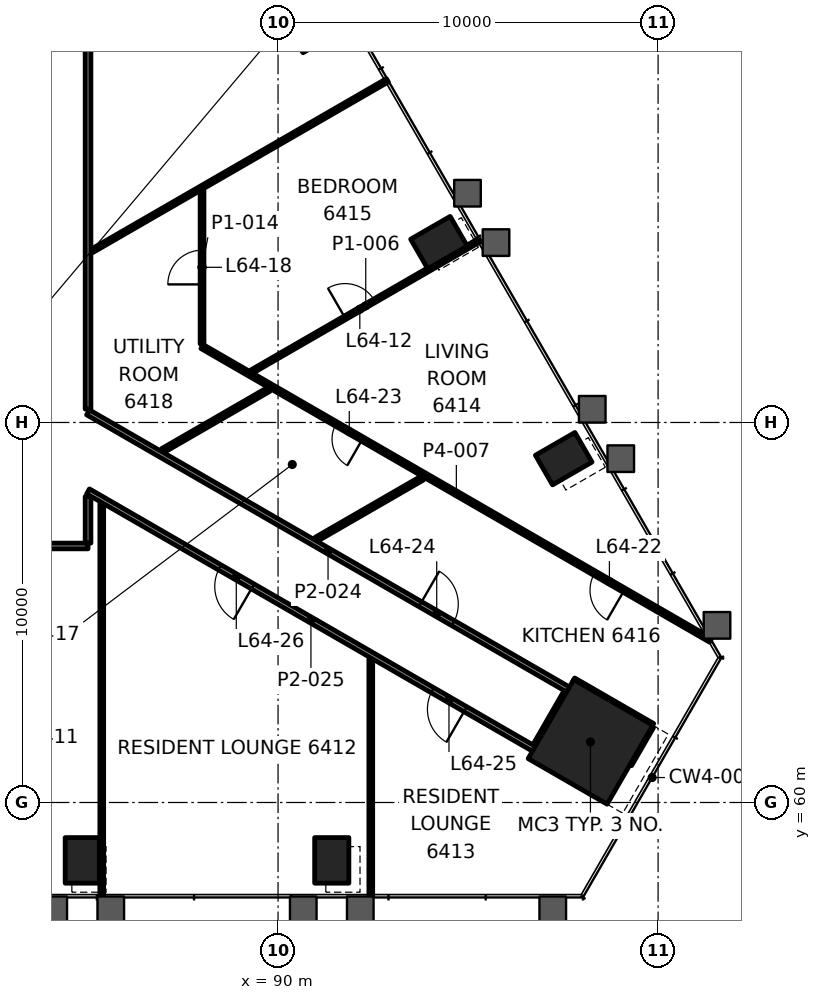
"""IFC4 building model, lengths in metres.
Left out: names, types, materials, properties, quantities, classifications, styles, units other than length and angle.
Written with IfcOpenShell. Run it as: python <this file> out.ifc"""

import sys

from ifc_helpers import new_model, si_unit, direction, frame, frame_2d, origin, origin_2d, place, context, subcontext, project, spatial, rectangle, hollow_rectangle, extrude, element, fill, save


model = new_model("IFC4")
c1 = context("Model", 3, precision=1e-05, world=origin(), true_north=direction((0.0, 1.0)))
c2 = subcontext(c1, "Body", "Model", "MODEL_VIEW")
j1 = project(units=[si_unit("LENGTHUNIT", "METRE"), si_unit("PLANEANGLEUNIT", "RADIAN")], contexts=[c1])
p1 = place(None, origin())
s1 = spatial("IfcSite", under=j1, at=p1, CompositionType="ELEMENT")
p2 = place(p1, origin())
s2 = spatial("IfcBuilding", under=s1, at=p2, CompositionType="ELEMENT")
p3 = place(p2, frame((0.0, 0.0, 270.6)))
s3 = spatial("IfcBuildingStorey", under=s2, at=p3, CompositionType="ELEMENT", Elevation=270.6)
p4 = place(p3, frame((98.22, 61.594, 0.0), z_axis=(0.0, 0.0, 1.0), x_axis=(0.5, 0.866025403784, 0.0)))
e1 = element("IfcColumn", 1, at=p4, inside=s3, PredefinedType="COLUMN", context=c2, shape_type="SweptSolid", body=[
    extrude(rectangle(XDim=2.4, YDim=2.4, at=origin_2d()), origin(), (0.0, 0.0, 1.0), 3.5),
])
for number, where, z_axis, x_axis in (
    (2, (84.848, 58.476, -0.0), (0.0, 0.0, 1.0), (1.0, 0.0, 0.0)),
    (3, (91.413, 58.476, -0.0), (0.0, 0.0, 1.0), (1.0, 0.0, 0.0)),
    (4, (97.517, 69.047, -0.0), (0.0, 0.0, 1.0), (-0.5, 0.866, 0.0)),
    (5, (94.234, 74.733, -0.0), (0.0, 0.0, 1.0), (-0.5, 0.866, 0.0)),
    (6, (90.951, 80.419, -0.0), (0.0, 0.0, 1.0), (-0.5, 0.866, 0.0)),
):
    element("IfcColumn", number, at=place(p3, frame(where, z_axis=z_axis, x_axis=x_axis)), inside=s3, PredefinedType="COLUMN", context=c2, shape_type="SweptSolid", body=[
        extrude(hollow_rectangle(XDim=0.9, YDim=1.2, WallThickness=0.06, at=origin_2d()), origin(), (0.0, 0.0, 1.0), 3.5),
    ])
p5 = place(p3, frame((85.0, 66.75, 0.0), z_axis=(0.0, 0.0, 1.0), x_axis=(-1.0, 0.0, 0.0)))
e7 = element("IfcWall", 7, at=p5, inside=s3, PredefinedType="PARTITIONING", context=c2, shape_type="SweptSolid", body=[
    extrude(rectangle(XDim=19.999, YDim=0.15, at=frame_2d((10.0, 0.0))), origin(), (0.0, 0.0, 1.0), 2.7),
])
p6 = place(p5, frame((2.96, 0.0, 0.0)))
e8 = element("IfcOpeningElement", 8, at=p6, cuts=e7, PredefinedType="OPENING", context=c2, shape_type="SweptSolid", body=[
    extrude(rectangle(XDim=1.0, YDim=2.1, at=frame_2d((0.5, 1.05))), frame((0.0, 0.085, 0.0), z_axis=(0.0, -1.0, 0.0), x_axis=(1.0, 0.0, 0.0)), (0.0, 0.0, 1.0), 0.17),
])
p7 = place(p5, frame((7.361, 0.0, 0.0)))
e9 = element("IfcOpeningElement", 9, at=p7, cuts=e7, PredefinedType="OPENING", context=c2, shape_type="SweptSolid", body=[
    extrude(rectangle(XDim=0.9, YDim=2.1, at=frame_2d((0.45, 1.05))), frame((0.0, 0.085, 0.0), z_axis=(0.0, -1.0, 0.0), x_axis=(1.0, 0.0, 0.0)), (0.0, 0.0, 1.0), 0.17),
])
p8 = place(p5, frame((9.55, 0.0, 0.0)))
e10 = element("IfcOpeningElement", 10, at=p8, cuts=e7, PredefinedType="OPENING", context=c2, shape_type="SweptSolid", body=[
    extrude(rectangle(XDim=0.9, YDim=2.1, at=frame_2d((0.45, 1.05))), frame((0.0, 0.085, 0.0), z_axis=(0.0, -1.0, 0.0), x_axis=(1.0, 0.0, 0.0)), (0.0, 0.0, 1.0), 0.17),
])
p9 = place(p5, frame((11.738, 0.0, 0.0)))
e11 = element("IfcOpeningElement", 11, at=p9, cuts=e7, PredefinedType="OPENING", context=c2, shape_type="SweptSolid", body=[
    extrude(rectangle(XDim=0.9, YDim=2.1, at=frame_2d((0.45, 1.05))), frame((0.0, 0.085, 0.0), z_axis=(0.0, -1.0, 0.0), x_axis=(1.0, 0.0, 0.0)), (0.0, 0.0, 1.0), 0.17),
])
p10 = place(p5, frame((13.926, 0.0, 0.0)))
e12 = element("IfcOpeningElement", 12, at=p10, cuts=e7, PredefinedType="OPENING", context=c2, shape_type="SweptSolid", body=[
    extrude(rectangle(XDim=0.9, YDim=2.1, at=frame_2d((0.45, 1.05))), frame((0.0, 0.085, 0.0), z_axis=(0.0, -1.0, 0.0), x_axis=(1.0, 0.0, 0.0)), (0.0, 0.0, 1.0), 0.17),
])
p11 = place(p3, frame((91.005, 66.926, 0.0), z_axis=(0.0, 0.0, 1.0), x_axis=(0.866000447062, 0.500043223821, 0.0)))
e13 = element("IfcWall", 13, at=p11, inside=s3, PredefinedType="PARTITIONING", context=c2, shape_type="SweptSolid", body=[
    extrude(rectangle(XDim=3.228, YDim=0.12, at=frame_2d((1.614, 0.0))), origin(), (0.0, 0.0, 1.0), 2.7),
])
p12 = place(p3, frame((86.963, 69.259, 0.0), z_axis=(0.0, 0.0, 1.0), x_axis=(0.866033195618, 0.499986503906, 0.0)))
e14 = element("IfcWall", 14, at=p12, inside=s3, PredefinedType="PARTITIONING", context=c2, shape_type="SweptSolid", body=[
    extrude(rectangle(XDim=3.228, YDim=0.12, at=frame_2d((1.614, 0.0))), origin(), (0.0, 0.0, 1.0), 2.7),
])
p13 = place(p3, frame((89.311, 71.34, 0.0), z_axis=(0.0, 0.0, 1.0), x_axis=(0.866013442838, 0.500020716395, 0.0)))
e15 = element("IfcWall", 15, at=p13, inside=s3, PredefinedType="PARTITIONING", context=c2, shape_type="SweptSolid", body=[
    extrude(rectangle(XDim=6.92, YDim=0.1, at=frame_2d((3.46, 0.0))), origin(), (0.0, 0.0, 1.0), 2.688),
])
p14 = place(p13, frame((2.83, 0.0, 0.0)))
e16 = element("IfcOpeningElement", 16, at=p14, cuts=e15, PredefinedType="OPENING", context=c2, shape_type="SweptSolid", body=[
    extrude(rectangle(XDim=0.9, YDim=2.1, at=frame_2d((0.45, 1.05))), frame((0.0, 0.06, 0.0), z_axis=(0.0, -1.0, 0.0), x_axis=(1.0, 0.0, 0.0)), (0.0, 0.0, 1.0), 0.12),
])
p15 = place(p3, frame((85.101, 74.514, 0.0), z_axis=(0.0, 0.0, 1.0), x_axis=(0.866020765707, 0.500008033299, 0.0)))
e17 = element("IfcWall", 17, at=p15, inside=s3, PredefinedType="PARTITIONING", context=c2, shape_type="SweptSolid", body=[
    extrude(rectangle(XDim=8.979, YDim=0.1, at=frame_2d((4.489, 0.0))), origin(), (0.0, 0.0, 1.0), 2.688),
])
p16 = place(p3, frame((99.259, 60.994, 0.0), z_axis=(0.0, 0.0, 1.0), x_axis=(0.499906209203, 0.866079547155, 0.0)))
e18 = element("IfcWall", 18, at=p16, inside=s3, PredefinedType="PARTITIONING", context=c2, shape_type="SweptSolid", body=[
    extrude(rectangle(XDim=1.15, YDim=0.1, at=frame_2d((0.575, 0.0))), origin(), (0.0, 0.0, 1.0), 2.7),
])
p17 = place(p3, frame((96.769, 61.48, 0.0), z_axis=(0.0, 0.0, 1.0), x_axis=(0.500035172766, 0.866005095826, 0.0)))
e19 = element("IfcWall", 19, at=p17, inside=s3, PredefinedType="PARTITIONING", context=c2, shape_type="SweptSolid", body=[
    extrude(rectangle(XDim=1.645, YDim=0.15, at=frame_2d((0.822, 0.0))), origin(), (0.0, 0.0, 1.0), 2.547),
])
p18 = place(p3, frame((92.44, 57.516, 0.0), z_axis=(0.0, 0.0, 1.0), x_axis=(0.0, 1.0, 0.0)))
e20 = element("IfcWall", 20, at=p18, inside=s3, PredefinedType="PARTITIONING", context=c2, shape_type="SweptSolid", body=[
    extrude(rectangle(XDim=6.259, YDim=0.1, at=frame_2d((3.129, 0.0))), origin(), (0.0, 0.0, 1.0), 2.7),
])
p19 = place(p3, frame((88.0, 72.067, 0.0), z_axis=(0.0, 0.0, 1.0), x_axis=(0.0, 1.0, 0.0)))
e21 = element("IfcWall", 21, at=p19, inside=s3, PredefinedType="PARTITIONING", context=c2, shape_type="SweptSolid", body=[
    extrude(rectangle(XDim=4.033, YDim=0.1, at=frame_2d((2.017, 0.0))), origin(), (0.0, 0.0, 1.0), 2.7),
])
p20 = place(p19, frame((1.567, 0.0, 0.0)))
e22 = element("IfcOpeningElement", 22, at=p20, cuts=e21, PredefinedType="OPENING", context=c2, shape_type="SweptSolid", body=[
    extrude(rectangle(XDim=0.9, YDim=2.1, at=frame_2d((0.45, 1.05))), frame((0.0, 0.06, 0.0), z_axis=(0.0, -1.0, 0.0), x_axis=(1.0, 0.0, 0.0)), (0.0, 0.0, 1.0), 0.12),
])
p21 = place(p3, frame((85.361, 57.516, 0.0), z_axis=(0.0, 0.0, 1.0), x_axis=(0.0, 1.0, 0.0)))
e23 = element("IfcWall", 23, at=p21, inside=s3, PredefinedType="PARTITIONING", context=c2, shape_type="SweptSolid", body=[
    extrude(rectangle(XDim=10.346, YDim=0.1, at=frame_2d((5.173, 0.0))), origin(), (0.0, 0.0, 1.0), 2.547),
])
p22 = place(p3, frame((85.0, 66.825, 0.0), z_axis=(0.0, 0.0, 1.0), x_axis=(0.0, 1.0, 0.0)))
e24 = element("IfcWall", 24, at=p22, inside=s3, PredefinedType="PARTITIONING", context=c2, shape_type="SweptSolid", body=[
    extrude(rectangle(XDim=1.225, YDim=0.15, at=frame_2d((0.613, 0.0))), origin(), (0.0, 0.0, 1.0), 2.547),
])
p23 = place(p3, frame((85.0, 70.352, 0.0), z_axis=(0.0, 0.0, 1.0), x_axis=(0.0, 1.0, 0.0)))
e25 = element("IfcWall", 25, at=p23, inside=s3, PredefinedType="PARTITIONING", context=c2, shape_type="SweptSolid", body=[
    extrude(rectangle(XDim=12.897, YDim=0.15, at=frame_2d((6.449, 0.0))), origin(), (0.0, 0.0, 1.0), 2.7),
])
p24 = place(p3, frame((101.383, 64.271, 0.0), z_axis=(0.0, 0.0, 1.0), x_axis=(-0.86602851656, 0.499994608475, 0.0)))
e26 = element("IfcWall", 26, at=p24, inside=s3, PredefinedType="PARTITIONING", context=c2, shape_type="SweptSolid", body=[
    extrude(rectangle(XDim=15.453, YDim=0.12, at=frame_2d((7.727, 0.0))), origin(), (0.0, 0.0, 1.0), 2.7),
])
p25 = place(p24, frame((2.626, 0.0, 0.0)))
e27 = element("IfcOpeningElement", 27, at=p25, cuts=e26, PredefinedType="OPENING", context=c2, shape_type="SweptSolid", body=[
    extrude(rectangle(XDim=0.9, YDim=2.1, at=frame_2d((0.45, 1.05))), frame((0.0, 0.07, 0.0), z_axis=(0.0, -1.0, 0.0), x_axis=(1.0, 0.0, 0.0)), (0.0, 0.0, 1.0), 0.14),
])
p26 = place(p24, frame((10.579, 0.0, 0.0)))
e28 = element("IfcOpeningElement", 28, at=p26, cuts=e26, PredefinedType="OPENING", context=c2, shape_type="SweptSolid", body=[
    extrude(rectangle(XDim=0.8, YDim=2.1, at=frame_2d((0.4, 1.05))), frame((0.0, 0.07, 0.0), z_axis=(0.0, -1.0, 0.0), x_axis=(1.0, 0.0, 0.0)), (0.0, 0.0, 1.0), 0.14),
])
p27 = place(p3, frame((99.859, 62.033, 0.0), z_axis=(0.0, 0.0, 1.0), x_axis=(-0.866050077142, 0.499957262057, 0.0)))
e29 = element("IfcWall", 29, at=p27, inside=s3, PredefinedType="PARTITIONING", context=c2, shape_type="SweptSolid", body=[
    extrude(rectangle(XDim=2.4, YDim=0.1, at=frame_2d((1.2, 0.0))), origin(), (0.0, 0.0, 1.0), 2.7),
])
p28 = place(p3, frame((85.0, 70.266, 0.0), z_axis=(0.0, 0.0, 1.0), x_axis=(0.866026970734, -0.499997285954, 0.0)))
e30 = element("IfcWall", 30, at=p28, inside=s3, PredefinedType="PARTITIONING", context=c2, shape_type="SweptSolid", body=[
    extrude(rectangle(XDim=14.584, YDim=0.15, at=frame_2d((7.292, 0.0))), origin(), (0.0, 0.0, 1.0), 2.7),
])
p29 = place(p28, frame((10.094, 0.0, 0.0)))
e31 = element("IfcOpeningElement", 31, at=p29, cuts=e30, PredefinedType="OPENING", context=c2, shape_type="SweptSolid", body=[
    extrude(rectangle(XDim=1.0, YDim=2.1, at=frame_2d((0.5, 1.05))), frame((0.0, 0.085, 0.0), z_axis=(0.0, -1.0, 0.0), x_axis=(1.0, 0.0, 0.0)), (0.0, 0.0, 1.0), 0.17),
])
p30 = place(p3, frame((96.73, 61.415, 0.0), z_axis=(0.0, 0.0, 1.0), x_axis=(-0.866032805753, 0.499987179195, 0.0)))
e32 = element("IfcWall", 32, at=p30, inside=s3, PredefinedType="PARTITIONING", context=c2, shape_type="SweptSolid", body=[
    extrude(rectangle(XDim=13.545, YDim=0.15, at=frame_2d((6.772, 0.0))), origin(), (0.0, 0.0, 1.0), 2.547),
])
p31 = place(p30, frame((2.078, 0.0, 0.0)))
e33 = element("IfcOpeningElement", 33, at=p31, cuts=e32, PredefinedType="OPENING", context=c2, shape_type="SweptSolid", body=[
    extrude(rectangle(XDim=1.0, YDim=2.1, at=frame_2d((0.5, 1.05))), frame((0.0, 0.085, 0.0), z_axis=(0.0, -1.0, 0.0), x_axis=(1.0, 0.0, 0.0)), (0.0, 0.0, 1.0), 0.17),
])
p32 = place(p30, frame((8.54, 0.0, 0.0)))
e34 = element("IfcOpeningElement", 34, at=p32, cuts=e32, PredefinedType="OPENING", context=c2, shape_type="SweptSolid", body=[
    extrude(rectangle(XDim=1.0, YDim=2.1, at=frame_2d((0.5, 1.05))), frame((0.0, 0.085, 0.0), z_axis=(0.0, -1.0, 0.0), x_axis=(1.0, 0.0, 0.0)), (0.0, 0.0, 1.0), 0.17),
])
p33 = place(p14, origin())
e35 = element("IfcDoor", 35, at=p33, inside=s3, OperationType="SINGLE_SWING_LEFT", PredefinedType="DOOR", context=c2, shape_type="SweptSolid", body=[
    extrude(rectangle(XDim=0.9, YDim=2.1, at=frame_2d((0.45, 1.05))), frame((0.0, 0.025, 0.0), z_axis=(0.0, -1.0, 0.0), x_axis=(1.0, 0.0, 0.0)), (0.0, 0.0, 1.0), 0.05),
])
fill(e16, e35)
p34 = place(p20, origin())
e36 = element("IfcDoor", 36, at=p34, inside=s3, OperationType="SINGLE_SWING_LEFT", PredefinedType="DOOR", context=c2, shape_type="SweptSolid", body=[
    extrude(rectangle(XDim=0.9, YDim=2.1, at=frame_2d((0.45, 1.05))), frame((0.0, 0.025, 0.0), z_axis=(0.0, -1.0, 0.0), x_axis=(1.0, 0.0, 0.0)), (0.0, 0.0, 1.0), 0.05),
])
fill(e22, e36)
p35 = place(p25, origin())
e37 = element("IfcDoor", 37, at=p35, inside=s3, OperationType="SINGLE_SWING_LEFT", PredefinedType="DOOR", context=c2, shape_type="SweptSolid", body=[
    extrude(rectangle(XDim=0.9, YDim=2.1, at=frame_2d((0.45, 1.05))), frame((0.0, 0.025, 0.0), z_axis=(0.0, -1.0, 0.0), x_axis=(1.0, 0.0, 0.0)), (0.0, 0.0, 1.0), 0.05),
])
fill(e27, e37)
p36 = place(p26, origin())
e38 = element("IfcDoor", 38, at=p36, inside=s3, OperationType="SINGLE_SWING_RIGHT", PredefinedType="DOOR", context=c2, shape_type="SweptSolid", body=[
    extrude(rectangle(XDim=0.8, YDim=2.1, at=frame_2d((0.4, 1.05))), frame((0.0, 0.025, 0.0), z_axis=(0.0, -1.0, 0.0), x_axis=(1.0, 0.0, 0.0)), (0.0, 0.0, 1.0), 0.05),
])
fill(e28, e38)
p37 = place(p29, origin())
e39 = element("IfcDoor", 39, at=p37, inside=s3, OperationType="SINGLE_SWING_LEFT", PredefinedType="DOOR", context=c2, shape_type="SweptSolid", body=[
    extrude(rectangle(XDim=1.0, YDim=2.1, at=frame_2d((0.5, 1.05))), frame((0.0, 0.025, 0.0), z_axis=(0.0, -1.0, 0.0), x_axis=(1.0, 0.0, 0.0)), (0.0, 0.0, 1.0), 0.05),
])
fill(e31, e39)
p38 = place(p31, origin())
e40 = element("IfcDoor", 40, at=p38, inside=s3, OperationType="SINGLE_SWING_RIGHT", PredefinedType="DOOR", context=c2, shape_type="SweptSolid", body=[
    extrude(rectangle(XDim=1.0, YDim=2.1, at=frame_2d((0.5, 1.05))), frame((0.0, 0.025, 0.0), z_axis=(0.0, -1.0, 0.0), x_axis=(1.0, 0.0, 0.0)), (0.0, 0.0, 1.0), 0.05),
])
fill(e33, e40)
p39 = place(p32, origin())
e41 = element("IfcDoor", 41, at=p39, inside=s3, OperationType="SINGLE_SWING_LEFT", PredefinedType="DOOR", context=c2, shape_type="SweptSolid", body=[
    extrude(rectangle(XDim=1.0, YDim=2.1, at=frame_2d((0.5, 1.05))), frame((0.0, 0.025, 0.0), z_axis=(0.0, -1.0, 0.0), x_axis=(1.0, 0.0, 0.0)), (0.0, 0.0, 1.0), 0.05),
])
fill(e34, e41)
save(model, sys.argv[1])
